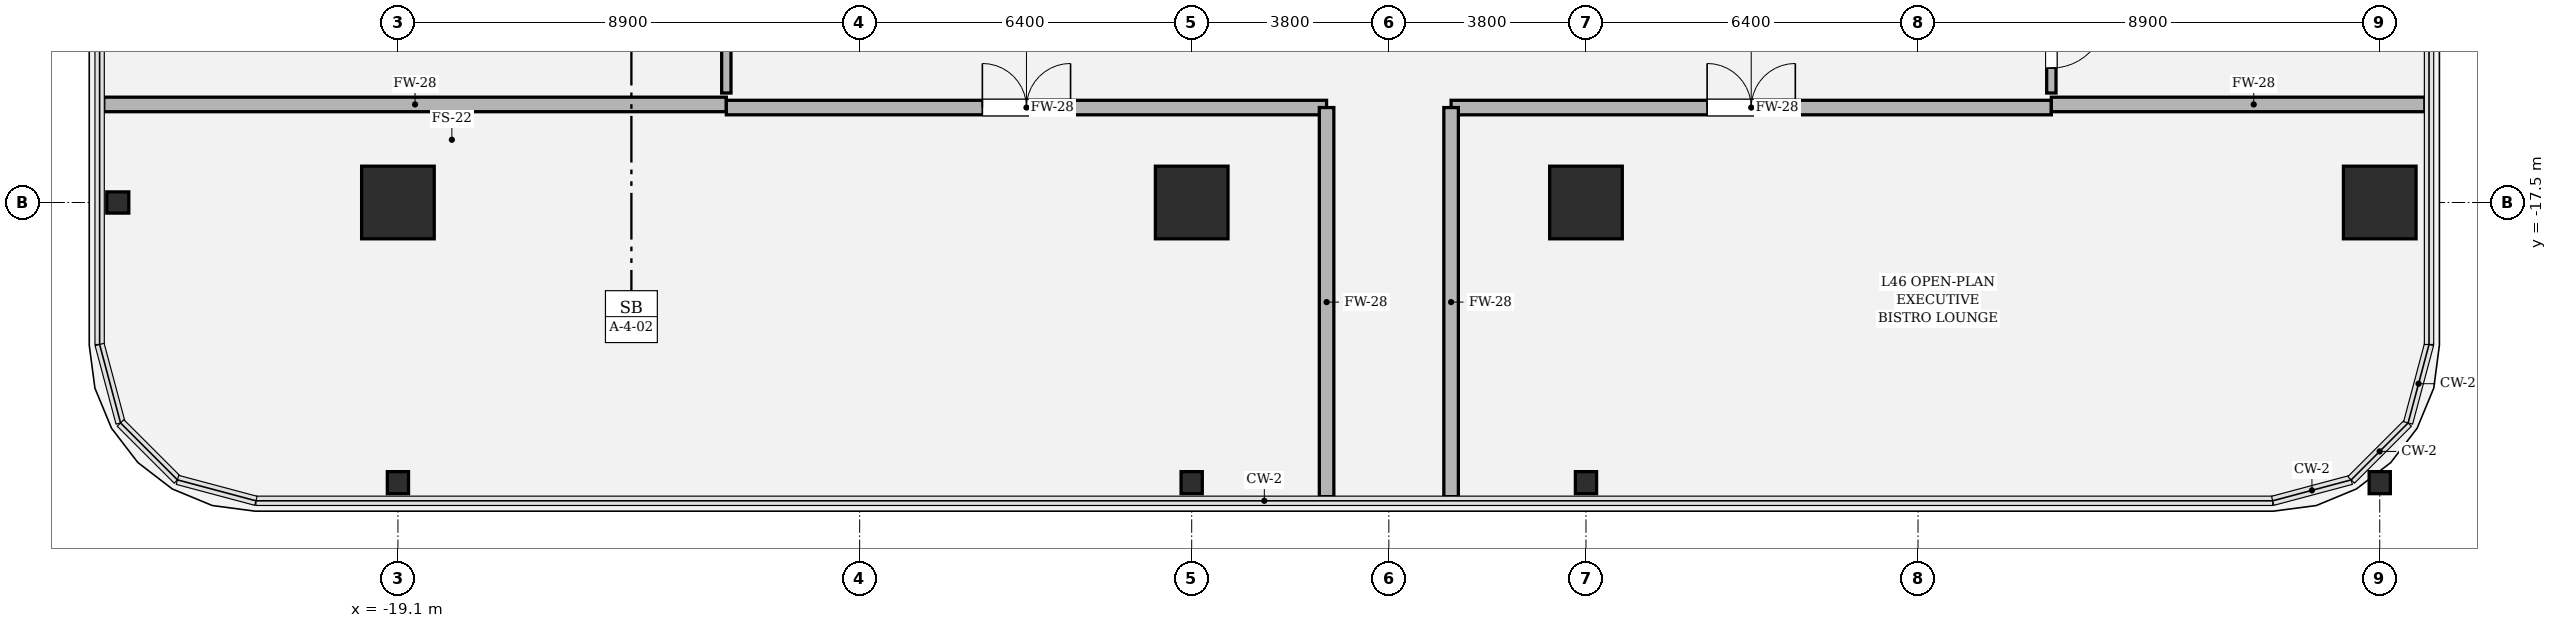
"""IFC4 building model, lengths in metres.
Left out: names, types, materials, properties, quantities, classifications, styles, units other than length and angle.
Written with IfcOpenShell. Run it as: python <this file> out.ifc"""

import sys

from ifc_helpers import new_model, si_unit, direction, frame, frame_2d, origin, origin_2d, place, context, subcontext, project, spatial, rectangle, hollow_rectangle, i_section, extrude, element, fill, save


model = new_model("IFC4")
c1 = context("Model", 3, precision=1e-05, world=origin(), true_north=direction((0.0, 1.0)))
c2 = subcontext(c1, "Body", "Model", "MODEL_VIEW")
j1 = project(units=[si_unit("LENGTHUNIT", "METRE"), si_unit("PLANEANGLEUNIT", "RADIAN")], contexts=[c1])
p1 = place(None, origin())
s1 = spatial("IfcSite", under=j1, at=p1, CompositionType="ELEMENT")
p2 = place(p1, origin())
s2 = spatial("IfcBuilding", under=s1, at=p2, CompositionType="ELEMENT")
p3 = place(p2, frame((0.0, 0.0, 196.5)))
s3 = spatial("IfcBuildingStorey", under=s2, at=p3, CompositionType="ELEMENT", Elevation=196.5)
for number, where, z_axis, x_axis in (
    (1, (-19.1, -17.5, 0.0), (0.0, 0.0, 1.0), (1.0, 0.0, 0.0)),
    (2, (-3.8, -17.5, 0.0), (0.0, 0.0, 1.0), (1.0, 0.0, 0.0)),
    (3, (3.8, -17.5, 0.0), (0.0, 0.0, 1.0), (1.0, 0.0, 0.0)),
    (4, (19.1, -17.5, 0.0), (0.0, 0.0, 1.0), (1.0, 0.0, 0.0)),
):
    element("IfcColumn", number, at=place(p3, frame(where, z_axis=z_axis, x_axis=x_axis)), inside=s3, PredefinedType="COLUMN", context=c2, shape_type="SweptSolid", body=[
        extrude(hollow_rectangle(XDim=1.4, YDim=1.4, WallThickness=0.042, at=origin_2d()), origin(), (0.0, 0.0, 1.0), 4.05),
    ])
for number, where, z_axis, x_axis in (
    (5, (-19.1, -22.9, 0.0), (0.0, 0.0, 1.0), (1.0, 0.0, 0.0)),
    (6, (-3.8, -22.9, 0.0), (0.0, 0.0, 1.0), (1.0, 0.0, 0.0)),
    (7, (3.8, -22.9, 0.0), (0.0, 0.0, 1.0), (1.0, 0.0, 0.0)),
    (8, (19.1, -22.9, 0.0), (0.0, 0.0, 1.0), (1.0, 0.0, 0.0)),
    (9, (-24.5, -17.5, 0.0), (0.0, 0.0, 1.0), (0.0, 1.0, 0.0)),
):
    element("IfcColumn", number, at=place(p3, frame(where, z_axis=z_axis, x_axis=x_axis)), inside=s3, PredefinedType="COLUMN", context=c2, shape_type="SweptSolid", body=[
        extrude(i_section(OverallWidth=0.409, OverallDepth=0.425, WebThickness=0.032, FlangeThickness=0.052, FilletRadius=0.018, at=origin_2d()), origin(), (0.0, 0.0, 1.0), 4.048),
    ])
p4 = place(p3, frame((-24.77, -15.61, 0.0), z_axis=(0.0, 0.0, 1.0), x_axis=(1.0, 0.0, 0.0)))
e10 = element("IfcWall", 10, at=p4, inside=s3, PredefinedType="SOLIDWALL", context=c2, shape_type="SweptSolid", body=[
    extrude(rectangle(XDim=12.0, YDim=0.28, at=frame_2d((6.0, 0.0))), origin(), (0.0, 0.0, 1.0), 2.544),
])
p5 = place(p3, frame((-12.77, -15.67, 0.0), z_axis=(0.0, 0.0, 1.0), x_axis=(1.0, 0.0, 0.0)))
e11 = element("IfcWall", 11, at=p5, inside=s3, PredefinedType="SOLIDWALL", context=c2, shape_type="SweptSolid", body=[
    extrude(rectangle(XDim=11.57, YDim=0.28, at=frame_2d((5.785, 0.0))), origin(), (0.0, 0.0, 1.0), 3.174),
])
p6 = place(p5, frame((4.935, 0.0, 0.0)))
e12 = element("IfcOpeningElement", 12, at=p6, cuts=e11, PredefinedType="OPENING", context=c2, shape_type="SweptSolid", body=[
    extrude(rectangle(XDim=1.7, YDim=2.3, at=frame_2d((0.85, 1.15))), frame((0.0, 0.15, 0.0), z_axis=(0.0, -1.0, 0.0), x_axis=(1.0, 0.0, 0.0)), (0.0, 0.0, 1.0), 0.3),
])
p7 = place(p3, frame((-1.2, -15.67, 0.0), z_axis=(0.0, 0.0, 1.0), x_axis=(0.0, -1.0, 0.0)))
e13 = element("IfcWall", 13, at=p7, inside=s3, PredefinedType="SOLIDWALL", context=c2, shape_type="SweptSolid", body=[
    extrude(rectangle(XDim=7.5, YDim=0.28, at=frame_2d((3.75, 0.0))), origin(), (0.0, 0.0, 1.0), 2.544),
])
p8 = place(p3, frame((1.2, -15.67, 0.0), z_axis=(0.0, 0.0, 1.0), x_axis=(1.0, 0.0, 0.0)))
e14 = element("IfcWall", 14, at=p8, inside=s3, PredefinedType="SOLIDWALL", context=c2, shape_type="SweptSolid", body=[
    extrude(rectangle(XDim=11.57, YDim=0.28, at=frame_2d((5.785, 0.0))), origin(), (0.0, 0.0, 1.0), 3.174),
])
p9 = place(p8, frame((4.935, 0.0, 0.0)))
e15 = element("IfcOpeningElement", 15, at=p9, cuts=e14, PredefinedType="OPENING", context=c2, shape_type="SweptSolid", body=[
    extrude(rectangle(XDim=1.7, YDim=2.3, at=frame_2d((0.85, 1.15))), frame((0.0, 0.15, 0.0), z_axis=(0.0, -1.0, 0.0), x_axis=(1.0, 0.0, 0.0)), (0.0, 0.0, 1.0), 0.3),
])
p10 = place(p3, frame((12.77, -15.61, 0.0), z_axis=(0.0, 0.0, 1.0), x_axis=(1.0, 0.0, 0.0)))
e16 = element("IfcWall", 16, at=p10, inside=s3, PredefinedType="SOLIDWALL", context=c2, shape_type="SweptSolid", body=[
    extrude(rectangle(XDim=7.2, YDim=0.28, at=frame_2d((3.6, 0.0))), origin(), (0.0, 0.0, 1.0), 3.174),
])
p11 = place(p3, frame((1.2, -23.17, 0.0), z_axis=(0.0, 0.0, 1.0), x_axis=(0.0, 1.0, 0.0)))
e17 = element("IfcWall", 17, at=p11, inside=s3, PredefinedType="SOLIDWALL", context=c2, shape_type="SweptSolid", body=[
    extrude(rectangle(XDim=7.5, YDim=0.28, at=frame_2d((3.75, 0.0))), origin(), (0.0, 0.0, 1.0), 2.544),
])
p12 = place(p3, frame((12.77, -15.39, 0.0), z_axis=(0.0, 0.0, 1.0), x_axis=(0.0, 1.0, 0.0)))
e18 = element("IfcWall", 18, at=p12, inside=s3, PredefinedType="PARTITIONING", context=c2, shape_type="SweptSolid", body=[
    extrude(rectangle(XDim=2.01, YDim=0.18, at=frame_2d((1.005, 0.0))), origin(), (0.0, 0.0, 1.0), 3.424),
])
p13 = place(p12, frame((0.48, 0.0, 0.0)))
e19 = element("IfcOpeningElement", 19, at=p13, cuts=e18, PredefinedType="OPENING", context=c2, shape_type="SweptSolid", body=[
    extrude(rectangle(XDim=1.05, YDim=2.2, at=frame_2d((0.525, 1.1))), frame((0.0, 0.1, 0.0), z_axis=(0.0, -1.0, 0.0), x_axis=(1.0, 0.0, 0.0)), (0.0, 0.0, 1.0), 0.2),
])
p14 = place(p3, frame((-12.77, -13.38, 0.0), z_axis=(0.0, 0.0, 1.0), x_axis=(0.0, -1.0, 0.0)))
e20 = element("IfcWall", 20, at=p14, inside=s3, PredefinedType="PARTITIONING", context=c2, shape_type="SweptSolid", body=[
    extrude(rectangle(XDim=2.01, YDim=0.18, at=frame_2d((1.005, 0.0))), origin(), (0.0, 0.0, 1.0), 3.424),
])
p15 = place(p6, origin())
e21 = element("IfcDoor", 21, at=p15, inside=s3, OperationType="DOUBLE_DOOR_SINGLE_SWING", PredefinedType="DOOR", context=c2, shape_type="SweptSolid", body=[
    extrude(rectangle(XDim=1.7, YDim=2.3, at=frame_2d((0.85, 1.15))), frame((0.0, 0.025, 0.0), z_axis=(0.0, -1.0, 0.0), x_axis=(1.0, 0.0, 0.0)), (0.0, 0.0, 1.0), 0.05),
])
fill(e12, e21)
p16 = place(p9, origin())
e22 = element("IfcDoor", 22, at=p16, inside=s3, OperationType="DOUBLE_DOOR_SINGLE_SWING", PredefinedType="DOOR", context=c2, shape_type="SweptSolid", body=[
    extrude(rectangle(XDim=1.7, YDim=2.3, at=frame_2d((0.85, 1.15))), frame((0.0, 0.025, 0.0), z_axis=(0.0, -1.0, 0.0), x_axis=(1.0, 0.0, 0.0)), (0.0, 0.0, 1.0), 0.05),
])
fill(e15, e22)
p17 = place(p13, origin())
e23 = element("IfcDoor", 23, at=p17, inside=s3, OperationType="SINGLE_SWING_RIGHT", PredefinedType="DOOR", context=c2, shape_type="SweptSolid", body=[
    extrude(rectangle(XDim=1.05, YDim=2.2, at=frame_2d((0.525, 1.1))), frame((0.0, 0.025, 0.0), z_axis=(0.0, -1.0, 0.0), x_axis=(1.0, 0.0, 0.0)), (0.0, 0.0, 1.0), 0.05),
])
fill(e19, e23)
save(model, sys.argv[1])
